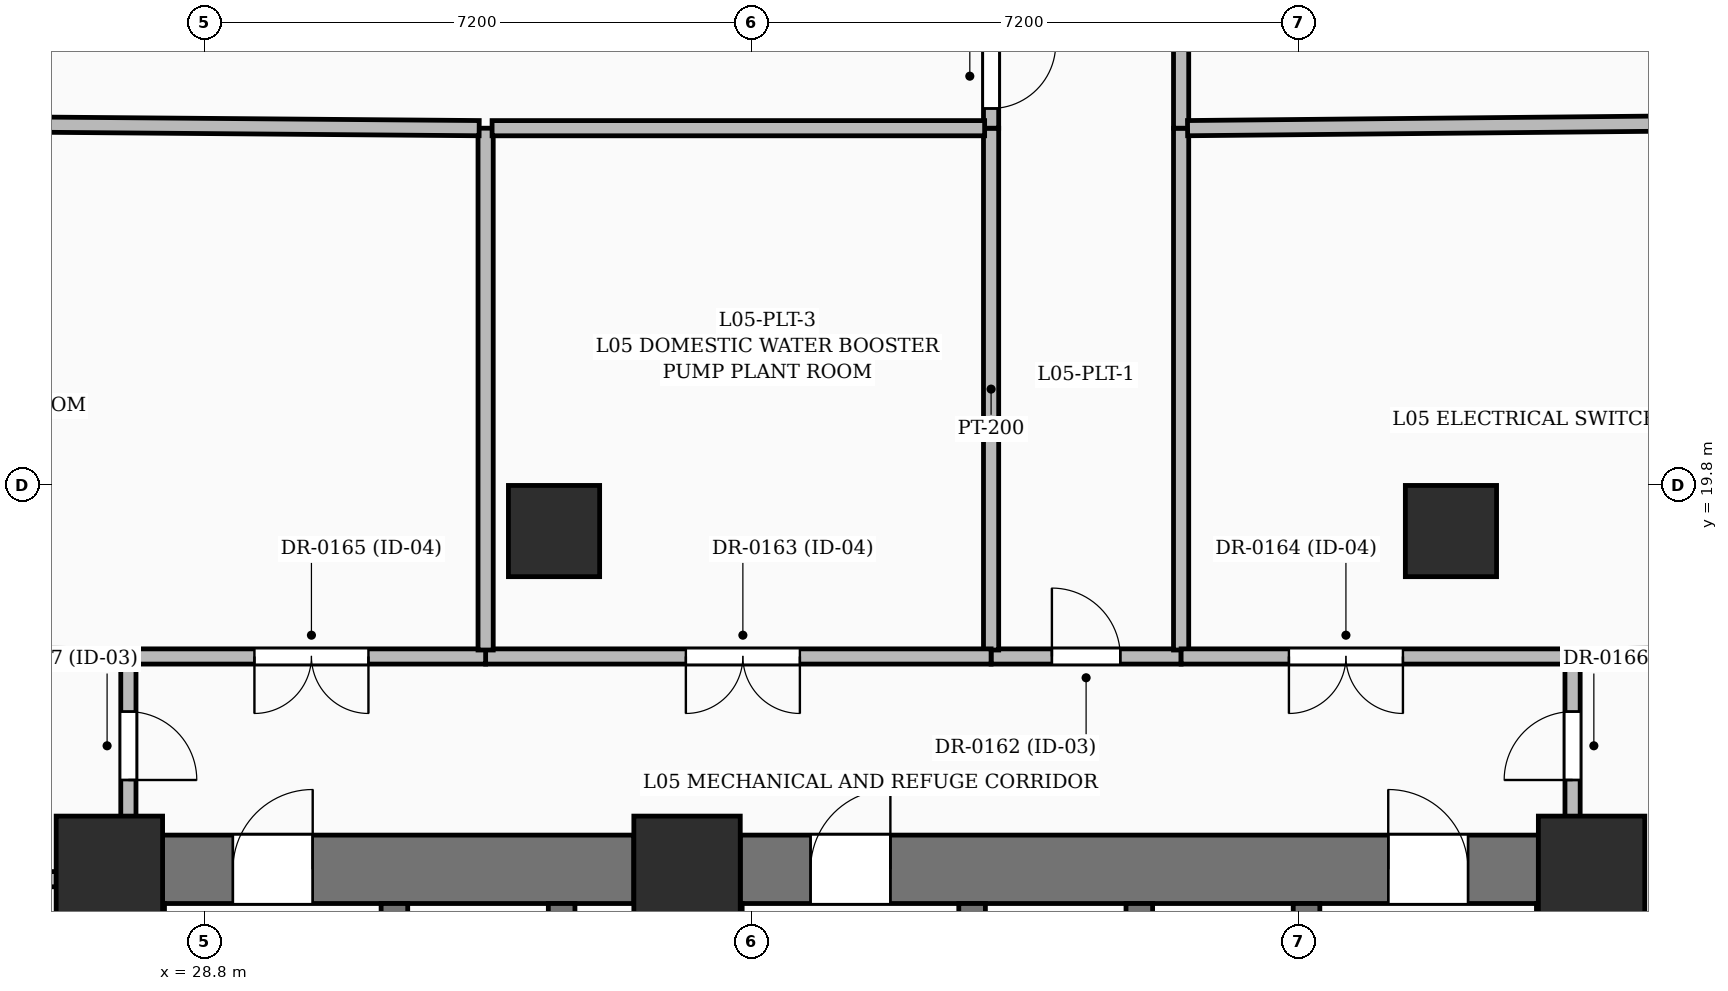
"""IFC4 building model, lengths in metres.
Left out: names, types, materials, properties, quantities, classifications, styles, units other than length and angle.
Written with IfcOpenShell. Run it as: python <this file> out.ifc"""

import sys

from ifc_helpers import new_model, si_unit, direction, frame, frame_2d, origin, origin_2d, place, context, subcontext, project, spatial, rectangle, extrude, element, fill, save


model = new_model("IFC4")
c1 = context("Model", 3, precision=1e-05, world=origin(), true_north=direction((0.0, 1.0)))
c2 = subcontext(c1, "Body", "Model", "MODEL_VIEW")
j1 = project(units=[si_unit("LENGTHUNIT", "METRE"), si_unit("PLANEANGLEUNIT", "RADIAN")], contexts=[c1])
p1 = place(None, origin())
s1 = spatial("IfcSite", under=j1, at=p1, CompositionType="ELEMENT")
p2 = place(p1, origin())
s2 = spatial("IfcBuilding", under=s1, at=p2, CompositionType="ELEMENT")
p3 = place(p2, frame((0.0, 0.0, 26.4)))
s3 = spatial("IfcBuildingStorey", under=s2, at=p3, CompositionType="ELEMENT", Elevation=26.4)
for number, where, z_axis, x_axis in (
    (1, (27.55, 14.75, 0.0), (0.0, 0.0, 1.0), (1.0, 0.0, 0.0)),
    (2, (35.15, 14.75, 0.0), (0.0, 0.0, 1.0), (1.0, 0.0, 0.0)),
    (3, (47.05, 14.75, 0.0), (0.0, 0.0, 1.0), (1.0, 0.0, 0.0)),
):
    element("IfcColumn", number, at=place(p3, frame(where, z_axis=z_axis, x_axis=x_axis)), inside=s3, PredefinedType="COLUMN", context=c2, shape_type="SweptSolid", body=[
        extrude(rectangle(XDim=1.4, YDim=1.4, at=origin_2d()), origin(), (0.0, 0.0, 1.0), 5.4),
    ])
for number, where, z_axis, x_axis in (
    (4, (45.2, 19.2, 0.0), (0.0, 0.0, 1.0), (1.0, 0.0, 0.0)),
    (5, (33.4, 19.2, 0.0), (0.0, 0.0, 1.0), (1.0, 0.0, 0.0)),
):
    element("IfcColumn", number, at=place(p3, frame(where, z_axis=z_axis, x_axis=x_axis)), inside=s3, PredefinedType="COLUMN", context=c2, shape_type="SweptSolid", body=[
        extrude(rectangle(XDim=1.2, YDim=1.2, at=origin_2d()), origin(), (0.0, 0.0, 1.0), 5.4),
    ])
p4 = place(p3, frame((28.25, 14.75, 0.0), z_axis=(0.0, 0.0, 1.0), x_axis=(1.0, 0.0, 0.0)))
e6 = element("IfcWall", 6, at=p4, inside=s3, PredefinedType="SHEAR", context=c2, shape_type="SweptSolid", body=[
    extrude(rectangle(XDim=6.2, YDim=0.9, at=frame_2d((3.1, 0.0))), origin(), (0.0, 0.0, 1.0), 5.4),
])
p5 = place(p4, frame((0.925, 0.0, 0.0)))
e7 = element("IfcOpeningElement", 7, at=p5, cuts=e6, PredefinedType="OPENING", context=c2, shape_type="SweptSolid", body=[
    extrude(rectangle(XDim=1.05, YDim=2.15, at=frame_2d((0.525, 1.075))), frame((0.0, 0.46, 0.0), z_axis=(0.0, -1.0, 0.0), x_axis=(1.0, 0.0, 0.0)), (0.0, 0.0, 1.0), 0.92),
])
p6 = place(p3, frame((35.85, 14.75, 0.0), z_axis=(0.0, 0.0, 1.0), x_axis=(1.0, 0.0, 0.0)))
e8 = element("IfcWall", 8, at=p6, inside=s3, PredefinedType="SHEAR", context=c2, shape_type="SweptSolid", body=[
    extrude(rectangle(XDim=10.5, YDim=0.9, at=frame_2d((5.25, 0.0))), origin(), (0.0, 0.0, 1.0), 5.4),
])
p7 = place(p6, frame((0.925, 0.0, 0.0)))
e9 = element("IfcOpeningElement", 9, at=p7, cuts=e8, PredefinedType="OPENING", context=c2, shape_type="SweptSolid", body=[
    extrude(rectangle(XDim=1.05, YDim=2.15, at=frame_2d((0.525, 1.075))), frame((0.0, 0.46, 0.0), z_axis=(0.0, -1.0, 0.0), x_axis=(1.0, 0.0, 0.0)), (0.0, 0.0, 1.0), 0.92),
])
p8 = place(p6, frame((8.525, 0.0, 0.0)))
e10 = element("IfcOpeningElement", 10, at=p8, cuts=e8, PredefinedType="OPENING", context=c2, shape_type="SweptSolid", body=[
    extrude(rectangle(XDim=1.05, YDim=2.15, at=frame_2d((0.525, 1.075))), frame((0.0, 0.46, 0.0), z_axis=(0.0, -1.0, 0.0), x_axis=(1.0, 0.0, 0.0)), (0.0, 0.0, 1.0), 0.92),
])
p9 = place(p3, frame((28.1, 5.2, 0.0), z_axis=(0.0, 0.0, 1.0), x_axis=(0.0, 1.0, 0.0)))
e11 = element("IfcWall", 11, at=p9, inside=s3, PredefinedType="SOLIDWALL", context=c2, shape_type="SweptSolid", body=[
    extrude(rectangle(XDim=9.1, YDim=0.35, at=frame_2d((4.55, 0.0))), origin(), (0.0, 0.0, 1.0), 5.4),
])
p10 = place(p3, frame((31.3, 5.2, 0.0), z_axis=(0.0, 0.0, 1.0), x_axis=(0.0, 1.0, 0.0)))
e12 = element("IfcWall", 12, at=p10, inside=s3, PredefinedType="SOLIDWALL", context=c2, shape_type="SweptSolid", body=[
    extrude(rectangle(XDim=9.1, YDim=0.35, at=frame_2d((4.55, 0.0))), origin(), (0.0, 0.0, 1.0), 5.4),
])
p11 = place(p10, frame((6.02, 0.0, 0.0)))
e13 = element("IfcOpeningElement", 13, at=p11, cuts=e12, PredefinedType="OPENING", context=c2, shape_type="SweptSolid", body=[
    extrude(rectangle(XDim=1.0, YDim=2.15, at=frame_2d((0.5, 1.075))), frame((0.0, 0.185, 0.0), z_axis=(0.0, -1.0, 0.0), x_axis=(1.0, 0.0, 0.0)), (0.0, 0.0, 1.0), 0.37),
])
p12 = place(p3, frame((35.7, 5.2, 0.0), z_axis=(0.0, 0.0, 1.0), x_axis=(0.0, 1.0, 0.0)))
e14 = element("IfcWall", 14, at=p12, inside=s3, PredefinedType="SOLIDWALL", context=c2, shape_type="SweptSolid", body=[
    extrude(rectangle(XDim=9.1, YDim=0.35, at=frame_2d((4.55, 0.0))), origin(), (0.0, 0.0, 1.0), 5.4),
])
p13 = place(p12, frame((6.02, 0.0, 0.0)))
e15 = element("IfcOpeningElement", 15, at=p13, cuts=e14, PredefinedType="OPENING", context=c2, shape_type="SweptSolid", body=[
    extrude(rectangle(XDim=1.0, YDim=2.15, at=frame_2d((0.5, 1.075))), frame((0.0, 0.185, 0.0), z_axis=(0.0, -1.0, 0.0), x_axis=(1.0, 0.0, 0.0)), (0.0, 0.0, 1.0), 0.37),
])
p14 = place(p3, frame((38.9, 5.2, 0.0), z_axis=(0.0, 0.0, 1.0), x_axis=(0.0, 1.0, 0.0)))
e16 = element("IfcWall", 16, at=p14, inside=s3, PredefinedType="SOLIDWALL", context=c2, shape_type="SweptSolid", body=[
    extrude(rectangle(XDim=9.1, YDim=0.35, at=frame_2d((4.55, 0.0))), origin(), (0.0, 0.0, 1.0), 5.4),
])
p15 = place(p14, frame((6.02, 0.0, 0.0)))
e17 = element("IfcOpeningElement", 17, at=p15, cuts=e16, PredefinedType="OPENING", context=c2, shape_type="SweptSolid", body=[
    extrude(rectangle(XDim=1.0, YDim=2.15, at=frame_2d((0.5, 1.075))), frame((0.0, 0.185, 0.0), z_axis=(0.0, -1.0, 0.0), x_axis=(1.0, 0.0, 0.0)), (0.0, 0.0, 1.0), 0.37),
])
p16 = place(p3, frame((43.3, 5.2, 0.0), z_axis=(0.0, 0.0, 1.0), x_axis=(0.0, 1.0, 0.0)))
e18 = element("IfcWall", 18, at=p16, inside=s3, PredefinedType="SOLIDWALL", context=c2, shape_type="SweptSolid", body=[
    extrude(rectangle(XDim=9.1, YDim=0.35, at=frame_2d((4.55, 0.0))), origin(), (0.0, 0.0, 1.0), 5.4),
])
p17 = place(p16, frame((6.02, 0.0, 0.0)))
e19 = element("IfcOpeningElement", 19, at=p17, cuts=e18, PredefinedType="OPENING", context=c2, shape_type="SweptSolid", body=[
    extrude(rectangle(XDim=1.0, YDim=2.15, at=frame_2d((0.5, 1.075))), frame((0.0, 0.185, 0.0), z_axis=(0.0, -1.0, 0.0), x_axis=(1.0, 0.0, 0.0)), (0.0, 0.0, 1.0), 0.37),
])
p18 = place(p3, frame((46.5, 5.2, 0.0), z_axis=(0.0, 0.0, 1.0), x_axis=(0.0, 1.0, 0.0)))
e20 = element("IfcWall", 20, at=p18, inside=s3, PredefinedType="SOLIDWALL", context=c2, shape_type="SweptSolid", body=[
    extrude(rectangle(XDim=9.1, YDim=0.35, at=frame_2d((4.55, 0.0))), origin(), (0.0, 0.0, 1.0), 5.4),
])
for number, where, z_axis, x_axis in (
    (21, (33.5, 12.375, 0.0), (0.0, 0.0, 1.0), (0.0, 1.0, 0.0)),
    (22, (41.1, 12.375, 0.0), (0.0, 0.0, 1.0), (0.0, 1.0, 0.0)),
):
    element("IfcWall", number, at=place(p3, frame(where, z_axis=z_axis, x_axis=x_axis)), inside=s3, PredefinedType="SOLIDWALL", context=c2, shape_type="SweptSolid", body=[
        extrude(rectangle(XDim=1.925, YDim=0.35, at=frame_2d((0.962, 0.0))), origin(), (0.0, 0.0, 1.0), 5.4),
    ])
p19 = place(p3, frame((4.861, 6.142, 0.0), z_axis=(0.0, 0.0, 1.0), x_axis=(0.550210507218, 0.83502598627, 0.0)))
e23 = element("IfcWall", 23, at=p19, inside=s3, PredefinedType="PARAPET", context=c2, shape_type="SweptSolid", body=[
    extrude(rectangle(XDim=41.146, YDim=0.25, at=frame_2d((20.573, 0.0))), origin(), (0.0, 0.0, 1.0), 1.15),
])
p20 = place(p3, frame((47.2, 36.402, 0.0), z_axis=(0.0, 0.0, 1.0), x_axis=(0.550211524159, -0.835025316192, 0.0)))
e24 = element("IfcWall", 24, at=p20, inside=s3, PredefinedType="PARAPET", context=c2, shape_type="SweptSolid", body=[
    extrude(rectangle(XDim=36.239, YDim=0.25, at=frame_2d((18.119, 0.0))), origin(), (0.0, 0.0, 1.0), 1.15),
])
p21 = place(p3, frame((25.225, 14.62, 0.0), z_axis=(0.0, 0.0, 1.0), x_axis=(1.0, 0.0, 0.0)))
e25 = element("IfcWall", 25, at=p21, inside=s3, PredefinedType="PARTITIONING", context=c2, shape_type="SweptSolid", body=[
    extrude(rectangle(XDim=1.86, YDim=0.2, at=frame_2d((0.93, 0.0))), origin(), (0.0, 0.0, 1.0), 5.15),
])
p22 = place(p3, frame((39.15, 17.55, 0.0), z_axis=(0.0, 0.0, 1.0), x_axis=(1.0, 0.0, 0.0)))
e26 = element("IfcWall", 26, at=p22, inside=s3, PredefinedType="PARTITIONING", context=c2, shape_type="SweptSolid", body=[
    extrude(rectangle(XDim=2.5, YDim=0.2, at=frame_2d((1.25, 0.0))), origin(), (0.0, 0.0, 1.0), 5.15),
])
p23 = place(p22, frame((0.8, 0.0, 0.0)))
e27 = element("IfcOpeningElement", 27, at=p23, cuts=e26, PredefinedType="OPENING", context=c2, shape_type="SweptSolid", body=[
    extrude(rectangle(XDim=0.9, YDim=2.1, at=frame_2d((0.45, 1.05))), frame((0.0, 0.11, 0.0), z_axis=(0.0, -1.0, 0.0), x_axis=(1.0, 0.0, 0.0)), (0.0, 0.0, 1.0), 0.22),
])
for number, where, z_axis, x_axis in (
    (28, (39.15, 24.5, 0.0), (0.0, 0.0, 1.0), (0.0, -1.0, 0.0)),
    (29, (41.65, 17.635, 0.0), (0.0, 0.0, 1.0), (0.0, 1.0, 0.0)),
):
    element("IfcWall", number, at=place(p3, frame(where, z_axis=z_axis, x_axis=x_axis)), inside=s3, PredefinedType="PARTITIONING", context=c2, shape_type="SweptSolid", body=[
        extrude(rectangle(XDim=6.865, YDim=0.2, at=frame_2d((3.433, 0.0))), origin(), (0.0, 0.0, 1.0), 4.653),
    ])
p24 = place(p3, frame((41.65, 24.5, 0.0), z_axis=(0.0, 0.0, 1.0), x_axis=(0.0, 1.0, 0.0)))
e30 = element("IfcWall", 30, at=p24, inside=s3, PredefinedType="PARTITIONING", context=c2, shape_type="SweptSolid", body=[
    extrude(rectangle(XDim=2.8, YDim=0.2, at=frame_2d((1.4, 0.0))), origin(), (0.0, 0.0, 1.0), 4.109),
])
p25 = place(p3, frame((39.15, 27.215, 0.0), z_axis=(0.0, 0.0, 1.0), x_axis=(0.0, -1.0, 0.0)))
e31 = element("IfcWall", 31, at=p25, inside=s3, PredefinedType="PARTITIONING", context=c2, shape_type="SweptSolid", body=[
    extrude(rectangle(XDim=2.715, YDim=0.2, at=frame_2d((1.357, 0.0))), origin(), (0.0, 0.0, 1.0), 4.109),
])
p26 = place(p25, frame((1.606, 0.0, 0.0)))
e32 = element("IfcOpeningElement", 32, at=p26, cuts=e31, PredefinedType="OPENING", context=c2, shape_type="SweptSolid", body=[
    extrude(rectangle(XDim=0.85, YDim=2.1, at=frame_2d((0.425, 1.05))), frame((0.0, 0.11, 0.0), z_axis=(0.0, -1.0, 0.0), x_axis=(1.0, 0.0, 0.0)), (0.0, 0.0, 1.0), 0.22),
])
p27 = place(p3, frame((39.15, 17.55, 0.0), z_axis=(0.0, 0.0, 1.0), x_axis=(-1.0, 0.0, 0.0)))
e33 = element("IfcWall", 33, at=p27, inside=s3, PredefinedType="PARTITIONING", context=c2, shape_type="SweptSolid", body=[
    extrude(rectangle(XDim=6.65, YDim=0.2, at=frame_2d((3.325, 0.0))), origin(), (0.0, 0.0, 1.0), 4.109),
])
p28 = place(p27, frame((2.516, 0.0, 0.0)))
e34 = element("IfcOpeningElement", 34, at=p28, cuts=e33, PredefinedType="OPENING", context=c2, shape_type="SweptSolid", body=[
    extrude(rectangle(XDim=1.5, YDim=2.2, at=frame_2d((0.75, 1.1))), frame((0.0, 0.11, 0.0), z_axis=(0.0, -1.0, 0.0), x_axis=(1.0, 0.0, 0.0)), (0.0, 0.0, 1.0), 0.22),
])
p29 = place(p3, frame((46.8, 17.55, 0.0), z_axis=(0.0, 0.0, 1.0), x_axis=(-1.0, 0.0, 0.0)))
e35 = element("IfcWall", 35, at=p29, inside=s3, PredefinedType="PARTITIONING", context=c2, shape_type="SweptSolid", body=[
    extrude(rectangle(XDim=5.15, YDim=0.2, at=frame_2d((2.575, 0.0))), origin(), (0.0, 0.0, 1.0), 4.109),
])
p30 = place(p29, frame((2.232, 0.0, 0.0)))
e36 = element("IfcOpeningElement", 36, at=p30, cuts=e35, PredefinedType="OPENING", context=c2, shape_type="SweptSolid", body=[
    extrude(rectangle(XDim=1.5, YDim=2.2, at=frame_2d((0.75, 1.1))), frame((0.0, 0.11, 0.0), z_axis=(0.0, -1.0, 0.0), x_axis=(1.0, 0.0, 0.0)), (0.0, 0.0, 1.0), 0.22),
])
p31 = place(p3, frame((32.5, 17.55, 0.0), z_axis=(0.0, 0.0, 1.0), x_axis=(-1.0, 0.0, 0.0)))
e37 = element("IfcWall", 37, at=p31, inside=s3, PredefinedType="PARTITIONING", context=c2, shape_type="SweptSolid", body=[
    extrude(rectangle(XDim=4.7, YDim=0.2, at=frame_2d((2.35, 0.0))), origin(), (0.0, 0.0, 1.0), 5.15),
])
p32 = place(p31, frame((1.542, 0.0, 0.0)))
e38 = element("IfcOpeningElement", 38, at=p32, cuts=e37, PredefinedType="OPENING", context=c2, shape_type="SweptSolid", body=[
    extrude(rectangle(XDim=1.5, YDim=2.2, at=frame_2d((0.75, 1.1))), frame((0.0, 0.11, 0.0), z_axis=(0.0, -1.0, 0.0), x_axis=(1.0, 0.0, 0.0)), (0.0, 0.0, 1.0), 0.22),
])
p33 = place(p3, frame((46.8, 15.2, 0.0), z_axis=(0.0, 0.0, 1.0), x_axis=(0.0, 1.0, 0.0)))
e39 = element("IfcWall", 39, at=p33, inside=s3, PredefinedType="PARTITIONING", context=c2, shape_type="SweptSolid", body=[
    extrude(rectangle(XDim=2.265, YDim=0.2, at=frame_2d((1.133, 0.0))), origin(), (0.0, 0.0, 1.0), 4.109),
])
p34 = place(p33, frame((0.725, 0.0, 0.0)))
e40 = element("IfcOpeningElement", 40, at=p34, cuts=e39, PredefinedType="OPENING", context=c2, shape_type="SweptSolid", body=[
    extrude(rectangle(XDim=0.9, YDim=2.1, at=frame_2d((0.45, 1.05))), frame((0.0, 0.11, 0.0), z_axis=(0.0, -1.0, 0.0), x_axis=(1.0, 0.0, 0.0)), (0.0, 0.0, 1.0), 0.22),
])
p35 = place(p3, frame((27.8, 17.465, 0.0), z_axis=(0.0, 0.0, 1.0), x_axis=(0.0, -1.0, 0.0)))
e41 = element("IfcWall", 41, at=p35, inside=s3, PredefinedType="PARTITIONING", context=c2, shape_type="SweptSolid", body=[
    extrude(rectangle(XDim=2.265, YDim=0.2, at=frame_2d((1.133, 0.0))), origin(), (0.0, 0.0, 1.0), 5.15),
])
p36 = place(p35, frame((0.64, 0.0, 0.0)))
e42 = element("IfcOpeningElement", 42, at=p36, cuts=e41, PredefinedType="OPENING", context=c2, shape_type="SweptSolid", body=[
    extrude(rectangle(XDim=0.9, YDim=2.1, at=frame_2d((0.45, 1.05))), frame((0.0, 0.11, 0.0), z_axis=(0.0, -1.0, 0.0), x_axis=(1.0, 0.0, 0.0)), (0.0, 0.0, 1.0), 0.22),
])
p37 = place(p3, frame((32.5, 24.5, 0.0), z_axis=(0.0, 0.0, 1.0), x_axis=(0.0, -1.0, 0.0)))
e43 = element("IfcWall", 43, at=p37, inside=s3, PredefinedType="PARTITIONING", context=c2, shape_type="SweptSolid", body=[
    extrude(rectangle(XDim=6.865, YDim=0.2, at=frame_2d((3.433, 0.0))), origin(), (0.0, 0.0, 1.0), 4.028),
])
p38 = place(p3, frame((39.065, 24.5, 0.0), z_axis=(0.0, 0.0, 1.0), x_axis=(-1.0, 0.0, 0.0)))
e44 = element("IfcWall", 44, at=p38, inside=s3, PredefinedType="PARTITIONING", context=c2, shape_type="SweptSolid", body=[
    extrude(rectangle(XDim=6.48, YDim=0.2, at=frame_2d((3.24, 0.0))), origin(), (0.0, 0.0, 1.0), 4.109),
])
p39 = place(p3, frame((46.8, 17.55, 0.0), z_axis=(0.0, 0.0, 1.0), x_axis=(0.99996212841, 0.008702973367, 0.0)))
e45 = element("IfcWall", 45, at=p39, inside=s3, PredefinedType="PARTITIONING", context=c2, shape_type="SweptSolid", body=[
    extrude(rectangle(XDim=10.267, YDim=0.2, at=frame_2d((5.134, 0.0))), origin(), (0.0, 0.0, 1.0), 4.028),
])
p40 = place(p3, frame((52.646, 24.605, 0.0), z_axis=(0.0, 0.0, 1.0), x_axis=(-0.999954144913, -0.009576433153, 0.0)))
e46 = element("IfcWall", 46, at=p40, inside=s3, PredefinedType="PARTITIONING", context=c2, shape_type="SweptSolid", body=[
    extrude(rectangle(XDim=10.911, YDim=0.2, at=frame_2d((5.456, 0.0))), origin(), (0.0, 0.0, 1.0), 4.028),
])
p41 = place(p3, frame((14.913, 17.649, 0.0), z_axis=(0.0, 0.0, 1.0), x_axis=(0.999970566641, -0.00767240844, 0.0)))
e47 = element("IfcWall", 47, at=p41, inside=s3, PredefinedType="PARTITIONING", context=c2, shape_type="SweptSolid", body=[
    extrude(rectangle(XDim=12.887, YDim=0.2, at=frame_2d((6.444, 0.0))), origin(), (0.0, 0.0, 1.0), 4.028),
])
p42 = place(p3, frame((32.415, 24.5, 0.0), z_axis=(0.0, 0.0, 1.0), x_axis=(-0.999967999143, 0.00800004306, 0.0)))
e48 = element("IfcWall", 48, at=p42, inside=s3, PredefinedType="PARTITIONING", context=c2, shape_type="SweptSolid", body=[
    extrude(rectangle(XDim=13.062, YDim=0.2, at=frame_2d((6.531, 0.0))), origin(), (0.0, 0.0, 1.0), 4.028),
])
p43 = place(p5, origin())
e49 = element("IfcDoor", 49, at=p43, inside=s3, OperationType="SINGLE_SWING_RIGHT", PredefinedType="DOOR", context=c2, shape_type="SweptSolid", body=[
    extrude(rectangle(XDim=1.05, YDim=2.15, at=frame_2d((0.525, 1.075))), frame((0.0, 0.025, 0.0), z_axis=(0.0, -1.0, 0.0), x_axis=(1.0, 0.0, 0.0)), (0.0, 0.0, 1.0), 0.05),
])
fill(e7, e49)
p44 = place(p7, origin())
e50 = element("IfcDoor", 50, at=p44, inside=s3, OperationType="SINGLE_SWING_RIGHT", PredefinedType="DOOR", context=c2, shape_type="SweptSolid", body=[
    extrude(rectangle(XDim=1.05, YDim=2.15, at=frame_2d((0.525, 1.075))), frame((0.0, 0.025, 0.0), z_axis=(0.0, -1.0, 0.0), x_axis=(1.0, 0.0, 0.0)), (0.0, 0.0, 1.0), 0.05),
])
fill(e9, e50)
p45 = place(p8, origin())
e51 = element("IfcDoor", 51, at=p45, inside=s3, OperationType="SINGLE_SWING_LEFT", PredefinedType="DOOR", context=c2, shape_type="SweptSolid", body=[
    extrude(rectangle(XDim=1.05, YDim=2.15, at=frame_2d((0.525, 1.075))), frame((0.0, 0.025, 0.0), z_axis=(0.0, -1.0, 0.0), x_axis=(1.0, 0.0, 0.0)), (0.0, 0.0, 1.0), 0.05),
])
fill(e10, e51)
p46 = place(p23, origin())
e52 = element("IfcDoor", 52, at=p46, inside=s3, OperationType="SINGLE_SWING_LEFT", PredefinedType="DOOR", context=c2, shape_type="SweptSolid", body=[
    extrude(rectangle(XDim=0.9, YDim=2.1, at=frame_2d((0.45, 1.05))), frame((0.0, 0.025, 0.0), z_axis=(0.0, -1.0, 0.0), x_axis=(1.0, 0.0, 0.0)), (0.0, 0.0, 1.0), 0.05),
])
fill(e27, e52)
p47 = place(p28, origin())
e53 = element("IfcDoor", 53, at=p47, inside=s3, OperationType="DOUBLE_DOOR_SINGLE_SWING", PredefinedType="DOOR", context=c2, shape_type="SweptSolid", body=[
    extrude(rectangle(XDim=1.5, YDim=2.2, at=frame_2d((0.75, 1.1))), frame((0.0, 0.025, 0.0), z_axis=(0.0, -1.0, 0.0), x_axis=(1.0, 0.0, 0.0)), (0.0, 0.0, 1.0), 0.05),
])
fill(e34, e53)
p48 = place(p30, origin())
e54 = element("IfcDoor", 54, at=p48, inside=s3, OperationType="DOUBLE_DOOR_SINGLE_SWING", PredefinedType="DOOR", context=c2, shape_type="SweptSolid", body=[
    extrude(rectangle(XDim=1.5, YDim=2.2, at=frame_2d((0.75, 1.1))), frame((0.0, 0.025, 0.0), z_axis=(0.0, -1.0, 0.0), x_axis=(1.0, 0.0, 0.0)), (0.0, 0.0, 1.0), 0.05),
])
fill(e36, e54)
p49 = place(p32, origin())
e55 = element("IfcDoor", 55, at=p49, inside=s3, OperationType="DOUBLE_DOOR_SINGLE_SWING", PredefinedType="DOOR", context=c2, shape_type="SweptSolid", body=[
    extrude(rectangle(XDim=1.5, YDim=2.2, at=frame_2d((0.75, 1.1))), frame((0.0, 0.025, 0.0), z_axis=(0.0, -1.0, 0.0), x_axis=(1.0, 0.0, 0.0)), (0.0, 0.0, 1.0), 0.05),
])
fill(e38, e55)
p50 = place(p34, origin())
e56 = element("IfcDoor", 56, at=p50, inside=s3, OperationType="SINGLE_SWING_LEFT", PredefinedType="DOOR", context=c2, shape_type="SweptSolid", body=[
    extrude(rectangle(XDim=0.9, YDim=2.1, at=frame_2d((0.45, 1.05))), frame((0.0, 0.025, 0.0), z_axis=(0.0, -1.0, 0.0), x_axis=(1.0, 0.0, 0.0)), (0.0, 0.0, 1.0), 0.05),
])
fill(e40, e56)
p51 = place(p36, origin())
e57 = element("IfcDoor", 57, at=p51, inside=s3, OperationType="SINGLE_SWING_RIGHT", PredefinedType="DOOR", context=c2, shape_type="SweptSolid", body=[
    extrude(rectangle(XDim=0.9, YDim=2.1, at=frame_2d((0.45, 1.05))), frame((0.0, 0.025, 0.0), z_axis=(0.0, -1.0, 0.0), x_axis=(1.0, 0.0, 0.0)), (0.0, 0.0, 1.0), 0.05),
])
fill(e42, e57)
p52 = place(p26, origin())
e58 = element("IfcDoor", 58, at=p52, inside=s3, OperationType="SINGLE_SWING_LEFT", PredefinedType="DOOR", context=c2, shape_type="SweptSolid", body=[
    extrude(rectangle(XDim=0.85, YDim=2.1, at=frame_2d((0.425, 1.05))), frame((0.0, 0.025, 0.0), z_axis=(0.0, -1.0, 0.0), x_axis=(1.0, 0.0, 0.0)), (0.0, 0.0, 1.0), 0.05),
])
fill(e32, e58)
save(model, sys.argv[1])
